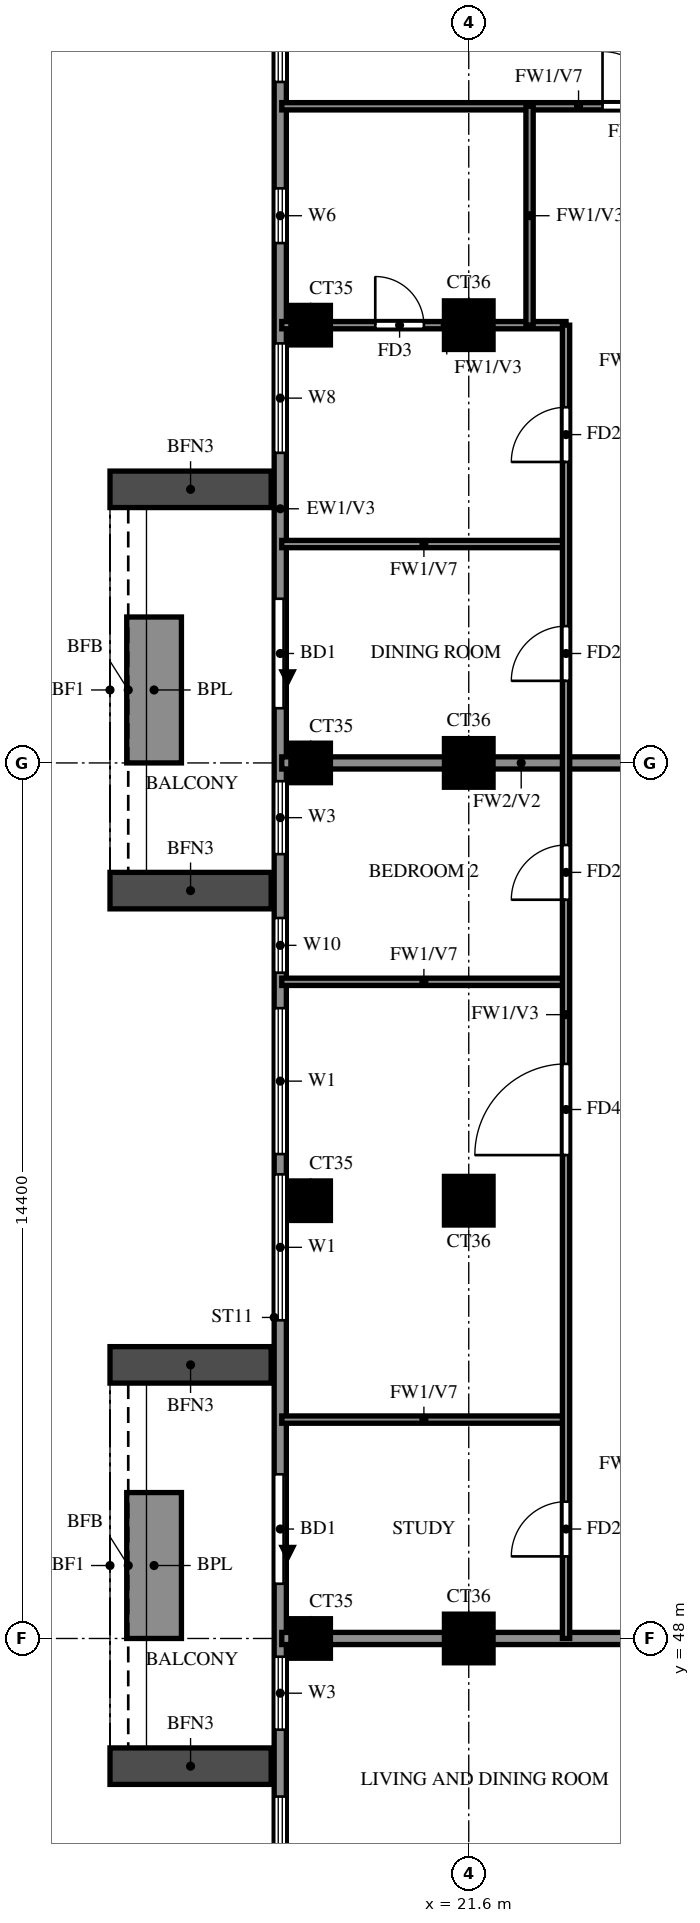
"""IFC4 building model, lengths in metres.
Left out: names, types, materials, properties, quantities, classifications, styles, units other than length and angle.
Written with IfcOpenShell. Run it as: python <this file> out.ifc"""

import sys

from ifc_helpers import new_model, si_unit, direction, frame, frame_2d, origin, origin_2d, place, context, subcontext, project, spatial, rectangle, extrude, source, transform, mapped, element, fill, save


model = new_model("IFC4")
c1 = context("Model", 3, precision=1e-05, world=origin(), true_north=direction((0.0, 1.0)))
c2 = subcontext(c1, "Body", "Model", "MODEL_VIEW")
j1 = project(units=[si_unit("LENGTHUNIT", "METRE"), si_unit("PLANEANGLEUNIT", "RADIAN")], contexts=[c1])
p1 = place(None, origin())
s1 = spatial("IfcSite", under=j1, at=p1, CompositionType="ELEMENT")
p2 = place(p1, origin())
s2 = spatial("IfcBuilding", under=s1, at=p2, CompositionType="ELEMENT")
p3 = place(p2, frame((0.0, 0.0, 250.0)))
s3 = spatial("IfcBuildingStorey", under=s2, at=p3, CompositionType="ELEMENT", Elevation=250.0)
m1 = source(origin(), c2, "Body", "SweptSolid", [
    extrude(rectangle(XDim=0.65, YDim=0.65, at=origin_2d()), origin(), (0.0, 0.0, 1.0), 3.22),
])
p4 = place(p3, frame((19.0, 48.0, 0.0), z_axis=(0.0, 0.0, 1.0), x_axis=(1.0, 0.0, 0.0)))
e1 = element("IfcColumn", 1, at=p4, inside=s3, PredefinedType="COLUMN", context=c2, shape_type="MappedRepresentation", body=[
    mapped(m1, transform((0.0, 0.0, 0.0))),
])
m2 = source(origin(), c2, "Body", "SweptSolid", [
    extrude(rectangle(XDim=0.8, YDim=0.8, at=origin_2d()), origin(), (0.0, 0.0, 1.0), 3.22),
])
p5 = place(p3, frame((21.6, 48.0, 0.0), z_axis=(0.0, 0.0, 1.0), x_axis=(1.0, 0.0, 0.0)))
e2 = element("IfcColumn", 2, at=p5, inside=s3, PredefinedType="COLUMN", context=c2, shape_type="MappedRepresentation", body=[
    mapped(m2, transform((0.0, 0.0, 0.0))),
])
p6 = place(p3, frame((19.0, 55.2, 0.0), z_axis=(0.0, 0.0, 1.0), x_axis=(1.0, 0.0, 0.0)))
e3 = element("IfcColumn", 3, at=p6, inside=s3, PredefinedType="COLUMN", context=c2, shape_type="MappedRepresentation", body=[
    mapped(m1, transform((0.0, 0.0, 0.0))),
])
p7 = place(p3, frame((21.6, 55.2, 0.0), z_axis=(0.0, 0.0, 1.0), x_axis=(1.0, 0.0, 0.0)))
e4 = element("IfcColumn", 4, at=p7, inside=s3, PredefinedType="COLUMN", context=c2, shape_type="MappedRepresentation", body=[
    mapped(m2, transform((0.0, 0.0, 0.0))),
])
p8 = place(p3, frame((19.0, 62.4, 0.0), z_axis=(0.0, 0.0, 1.0), x_axis=(1.0, 0.0, 0.0)))
e5 = element("IfcColumn", 5, at=p8, inside=s3, PredefinedType="COLUMN", context=c2, shape_type="MappedRepresentation", body=[
    mapped(m1, transform((0.0, 0.0, 0.0))),
])
p9 = place(p3, frame((21.6, 62.4, 0.0), z_axis=(0.0, 0.0, 1.0), x_axis=(1.0, 0.0, 0.0)))
e6 = element("IfcColumn", 6, at=p9, inside=s3, PredefinedType="COLUMN", context=c2, shape_type="MappedRepresentation", body=[
    mapped(m2, transform((0.0, 0.0, 0.0))),
])
p10 = place(p3, frame((19.0, 69.6, 0.0), z_axis=(0.0, 0.0, 1.0), x_axis=(1.0, 0.0, 0.0)))
e7 = element("IfcColumn", 7, at=p10, inside=s3, PredefinedType="COLUMN", context=c2, shape_type="MappedRepresentation", body=[
    mapped(m1, transform((0.0, 0.0, 0.0))),
])
p11 = place(p3, frame((21.6, 69.6, 0.0), z_axis=(0.0, 0.0, 1.0), x_axis=(1.0, 0.0, 0.0)))
e8 = element("IfcColumn", 8, at=p11, inside=s3, PredefinedType="COLUMN", context=c2, shape_type="MappedRepresentation", body=[
    mapped(m2, transform((0.0, 0.0, 0.0))),
])
p12 = place(p3, frame((18.5, 76.6, 0.0), z_axis=(0.0, 0.0, 1.0), x_axis=(0.0, -1.0, 0.0)))
e9 = element("IfcWall", 9, at=p12, inside=s3, PredefinedType="SOLIDWALL", context=c2, shape_type="SweptSolid", body=[
    extrude(rectangle(XDim=33.4, YDim=0.2, at=frame_2d((16.7, 0.0))), origin(), (0.0, 0.0, 1.0), 3.22),
])
p13 = place(p12, frame((11.5, 0.0, 0.0)))
e10 = element("IfcOpeningElement", 10, at=p13, cuts=e9, PredefinedType="OPENING", context=c2, shape_type="SweptSolid", body=[
    extrude(rectangle(XDim=1.8, YDim=2.4, at=frame_2d((0.9, 1.2))), frame((0.0, 0.11, 0.0), z_axis=(0.0, -1.0, 0.0), x_axis=(1.0, 0.0, 0.0)), (0.0, 0.0, 1.0), 0.22),
])
p14 = place(p12, frame((25.9, 0.0, 0.0)))
e11 = element("IfcOpeningElement", 11, at=p14, cuts=e9, PredefinedType="OPENING", context=c2, shape_type="SweptSolid", body=[
    extrude(rectangle(XDim=1.8, YDim=2.4, at=frame_2d((0.9, 1.2))), frame((0.0, 0.11, 0.0), z_axis=(0.0, -1.0, 0.0), x_axis=(1.0, 0.0, 0.0)), (0.0, 0.0, 1.0), 0.22),
])
p15 = place(p12, frame((28.9, 0.0, 0.6)))
e12 = element("IfcOpeningElement", 12, at=p15, cuts=e9, PredefinedType="OPENING", context=c2, shape_type="SweptSolid", body=[
    extrude(rectangle(XDim=1.2, YDim=2.4, at=frame_2d((0.6, 1.2))), frame((0.0, 0.11, 0.0), z_axis=(0.0, -1.0, 0.0), x_axis=(1.0, 0.0, 0.0)), (0.0, 0.0, 1.0), 0.22),
])
p16 = place(p12, frame((31.2, 0.0, 0.6)))
e13 = element("IfcOpeningElement", 13, at=p16, cuts=e9, PredefinedType="OPENING", context=c2, shape_type="SweptSolid", body=[
    extrude(rectangle(XDim=1.8, YDim=2.4, at=frame_2d((0.9, 1.2))), frame((0.0, 0.11, 0.0), z_axis=(0.0, -1.0, 0.0), x_axis=(1.0, 0.0, 0.0)), (0.0, 0.0, 1.0), 0.22),
])
p17 = place(p12, frame((18.233, 0.0, 0.6)))
e14 = element("IfcOpeningElement", 14, at=p17, cuts=e9, PredefinedType="OPENING", context=c2, shape_type="SweptSolid", body=[
    extrude(rectangle(XDim=2.4, YDim=2.4, at=frame_2d((1.2, 1.2))), frame((0.0, 0.11, 0.0), z_axis=(0.0, -1.0, 0.0), x_axis=(1.0, 0.0, 0.0)), (0.0, 0.0, 1.0), 0.22),
])
p18 = place(p12, frame((20.967, 0.0, 0.6)))
e15 = element("IfcOpeningElement", 15, at=p18, cuts=e9, PredefinedType="OPENING", context=c2, shape_type="SweptSolid", body=[
    extrude(rectangle(XDim=2.4, YDim=2.4, at=frame_2d((1.2, 1.2))), frame((0.0, 0.11, 0.0), z_axis=(0.0, -1.0, 0.0), x_axis=(1.0, 0.0, 0.0)), (0.0, 0.0, 1.0), 0.22),
])
p19 = place(p12, frame((14.5, 0.0, 0.6)))
e16 = element("IfcOpeningElement", 16, at=p19, cuts=e9, PredefinedType="OPENING", context=c2, shape_type="SweptSolid", body=[
    extrude(rectangle(XDim=1.2, YDim=2.4, at=frame_2d((0.6, 1.2))), frame((0.0, 0.11, 0.0), z_axis=(0.0, -1.0, 0.0), x_axis=(1.0, 0.0, 0.0)), (0.0, 0.0, 1.0), 0.22),
])
p20 = place(p12, frame((16.75, 0.0, 0.6)))
e17 = element("IfcOpeningElement", 17, at=p20, cuts=e9, PredefinedType="OPENING", context=c2, shape_type="SweptSolid", body=[
    extrude(rectangle(XDim=0.9, YDim=2.4, at=frame_2d((0.45, 1.2))), frame((0.0, 0.11, 0.0), z_axis=(0.0, -1.0, 0.0), x_axis=(1.0, 0.0, 0.0)), (0.0, 0.0, 1.0), 0.22),
])
p21 = place(p12, frame((7.3, 0.0, 0.6)))
e18 = element("IfcOpeningElement", 18, at=p21, cuts=e9, PredefinedType="OPENING", context=c2, shape_type="SweptSolid", body=[
    extrude(rectangle(XDim=1.8, YDim=2.4, at=frame_2d((0.9, 1.2))), frame((0.0, 0.11, 0.0), z_axis=(0.0, -1.0, 0.0), x_axis=(1.0, 0.0, 0.0)), (0.0, 0.0, 1.0), 0.22),
])
p22 = place(p12, frame((4.75, 0.0, 1.5)))
e19 = element("IfcOpeningElement", 19, at=p22, cuts=e9, PredefinedType="OPENING", context=c2, shape_type="SweptSolid", body=[
    extrude(rectangle(XDim=0.9, YDim=0.9, at=frame_2d((0.45, 0.45))), frame((0.0, 0.11, 0.0), z_axis=(0.0, -1.0, 0.0), x_axis=(1.0, 0.0, 0.0)), (0.0, 0.0, 1.0), 0.22),
])
p23 = place(p12, frame((0.6, 0.0, 0.6)))
e20 = element("IfcOpeningElement", 20, at=p23, cuts=e9, PredefinedType="OPENING", context=c2, shape_type="SweptSolid", body=[
    extrude(rectangle(XDim=2.4, YDim=2.4, at=frame_2d((1.2, 1.2))), frame((0.0, 0.11, 0.0), z_axis=(0.0, -1.0, 0.0), x_axis=(1.0, 0.0, 0.0)), (0.0, 0.0, 1.0), 0.22),
])
for number, where, z_axis, x_axis in (
    (21, (18.35, 66.9, 0.0), (0.0, 0.0, 1.0), (-1.0, 0.0, 0.0)),
    (22, (18.35, 60.3, 0.0), (0.0, 0.0, 1.0), (-1.0, 0.0, 0.0)),
):
    element("IfcWall", number, at=place(p3, frame(where, z_axis=z_axis, x_axis=x_axis)), inside=s3, PredefinedType="SOLIDWALL", context=c2, shape_type="SweptSolid", body=[
        extrude(rectangle(XDim=2.65, YDim=0.6, at=frame_2d((1.325, 0.0))), origin(), (0.0, 0.0, 1.0), 2.85),
    ])
p24 = place(p3, frame((16.425, 64.8, 0.0), z_axis=(0.0, 0.0, 1.0), x_axis=(0.0, -1.0, 0.0)))
e23 = element("IfcWall", 23, at=p24, inside=s3, PredefinedType="SOLIDWALL", context=c2, shape_type="SweptSolid", body=[
    extrude(rectangle(XDim=2.4, YDim=0.9, at=frame_2d((1.2, 0.0))), origin(), (0.0, 0.0, 1.0), 0.9),
])
for number, where, z_axis, x_axis in (
    (24, (18.35, 52.5, 0.0), (0.0, 0.0, 1.0), (-1.0, 0.0, 0.0)),
    (25, (18.35, 45.9, 0.0), (0.0, 0.0, 1.0), (-1.0, 0.0, 0.0)),
):
    element("IfcWall", number, at=place(p3, frame(where, z_axis=z_axis, x_axis=x_axis)), inside=s3, PredefinedType="SOLIDWALL", context=c2, shape_type="SweptSolid", body=[
        extrude(rectangle(XDim=2.65, YDim=0.6, at=frame_2d((1.325, 0.0))), origin(), (0.0, 0.0, 1.0), 2.85),
    ])
p25 = place(p3, frame((16.425, 50.4, 0.0), z_axis=(0.0, 0.0, 1.0), x_axis=(0.0, -1.0, 0.0)))
e26 = element("IfcWall", 26, at=p25, inside=s3, PredefinedType="SOLIDWALL", context=c2, shape_type="SweptSolid", body=[
    extrude(rectangle(XDim=2.4, YDim=0.9, at=frame_2d((1.2, 0.0))), origin(), (0.0, 0.0, 1.0), 0.9),
])
p26 = place(p3, frame((18.525, 48.0, 0.0), z_axis=(0.0, 0.0, 1.0), x_axis=(1.0, 0.0, 0.0)))
e27 = element("IfcWall", 27, at=p26, inside=s3, PredefinedType="SOLIDWALL", context=c2, shape_type="SweptSolid", body=[
    extrude(rectangle(XDim=15.075, YDim=0.2, at=frame_2d((7.538, 0.0))), origin(), (0.0, 0.0, 1.0), 3.22),
])
p27 = place(p3, frame((18.525, 62.4, 0.0), z_axis=(0.0, 0.0, 1.0), x_axis=(1.0, 0.0, 0.0)))
e28 = element("IfcWall", 28, at=p27, inside=s3, PredefinedType="SOLIDWALL", context=c2, shape_type="SweptSolid", body=[
    extrude(rectangle(XDim=7.875, YDim=0.2, at=frame_2d((3.938, 0.0))), origin(), (0.0, 0.0, 1.0), 3.22),
])
for number, where, z_axis, x_axis in (
    (29, (18.525, 51.6, 0.0), (0.0, 0.0, 1.0), (1.0, 0.0, 0.0)),
    (30, (18.525, 58.8, 0.0), (0.0, 0.0, 1.0), (1.0, 0.0, 0.0)),
    (31, (18.525, 66.0, 0.0), (0.0, 0.0, 1.0), (1.0, 0.0, 0.0)),
):
    element("IfcWall", number, at=place(p3, frame(where, z_axis=z_axis, x_axis=x_axis)), inside=s3, PredefinedType="PARTITIONING", context=c2, shape_type="SweptSolid", body=[
        extrude(rectangle(XDim=4.675, YDim=0.12, at=frame_2d((2.337, 0.0))), origin(), (0.0, 0.0, 1.0), 2.32),
    ])
p28 = place(p3, frame((18.525, 69.6, 0.0), z_axis=(0.0, 0.0, 1.0), x_axis=(1.0, 0.0, 0.0)))
e32 = element("IfcWall", 32, at=p28, inside=s3, PredefinedType="PARTITIONING", context=c2, shape_type="SweptSolid", body=[
    extrude(rectangle(XDim=4.675, YDim=0.12, at=frame_2d((2.337, 0.0))), origin(), (0.0, 0.0, 1.0), 3.22),
])
p29 = place(p28, frame((1.538, 0.0, 0.0)))
e33 = element("IfcOpeningElement", 33, at=p29, cuts=e32, PredefinedType="OPENING", context=c2, shape_type="SweptSolid", body=[
    extrude(rectangle(XDim=0.8, YDim=2.1, at=frame_2d((0.4, 1.05))), frame((0.0, 0.07, 0.0), z_axis=(0.0, -1.0, 0.0), x_axis=(1.0, 0.0, 0.0)), (0.0, 0.0, 1.0), 0.14),
])
p30 = place(p3, frame((18.525, 73.2, 0.0), z_axis=(0.0, 0.0, 1.0), x_axis=(1.0, 0.0, 0.0)))
e34 = element("IfcWall", 34, at=p30, inside=s3, PredefinedType="PARTITIONING", context=c2, shape_type="SweptSolid", body=[
    extrude(rectangle(XDim=10.275, YDim=0.12, at=frame_2d((5.138, 0.0))), origin(), (0.0, 0.0, 1.0), 2.32),
])
p31 = place(p30, frame((5.275, 0.0, 0.0)))
e35 = element("IfcOpeningElement", 35, at=p31, cuts=e34, PredefinedType="OPENING", context=c2, shape_type="SweptSolid", body=[
    extrude(rectangle(XDim=0.9, YDim=2.1, at=frame_2d((0.45, 1.05))), frame((0.0, 0.07, 0.0), z_axis=(0.0, -1.0, 0.0), x_axis=(1.0, 0.0, 0.0)), (0.0, 0.0, 1.0), 0.14),
])
p32 = place(p3, frame((22.6, 69.6, 0.0), z_axis=(0.0, 0.0, 1.0), x_axis=(0.0, 1.0, 0.0)))
e36 = element("IfcWall", 36, at=p32, inside=s3, PredefinedType="PARTITIONING", context=c2, shape_type="SweptSolid", body=[
    extrude(rectangle(XDim=3.6, YDim=0.12, at=frame_2d((1.8, 0.0))), origin(), (0.0, 0.0, 1.0), 3.22),
])
p33 = place(p3, frame((23.2, 48.0, 0.0), z_axis=(0.0, 0.0, 1.0), x_axis=(0.0, 1.0, 0.0)))
e37 = element("IfcWall", 37, at=p33, inside=s3, PredefinedType="PARTITIONING", context=c2, shape_type="SweptSolid", body=[
    extrude(rectangle(XDim=21.6, YDim=0.12, at=frame_2d((10.8, 0.0))), origin(), (0.0, 0.0, 1.0), 3.22),
])
p34 = place(p33, frame((1.35, 0.0, 0.0)))
e38 = element("IfcOpeningElement", 38, at=p34, cuts=e37, PredefinedType="OPENING", context=c2, shape_type="SweptSolid", body=[
    extrude(rectangle(XDim=0.9, YDim=2.1, at=frame_2d((0.45, 1.05))), frame((0.0, 0.07, 0.0), z_axis=(0.0, -1.0, 0.0), x_axis=(1.0, 0.0, 0.0)), (0.0, 0.0, 1.0), 0.14),
])
p35 = place(p33, frame((7.95, 0.0, 0.0)))
e39 = element("IfcOpeningElement", 39, at=p35, cuts=e37, PredefinedType="OPENING", context=c2, shape_type="SweptSolid", body=[
    extrude(rectangle(XDim=1.5, YDim=2.1, at=frame_2d((0.75, 1.05))), frame((0.0, 0.07, 0.0), z_axis=(0.0, -1.0, 0.0), x_axis=(1.0, 0.0, 0.0)), (0.0, 0.0, 1.0), 0.14),
])
p36 = place(p33, frame((12.15, 0.0, 0.0)))
e40 = element("IfcOpeningElement", 40, at=p36, cuts=e37, PredefinedType="OPENING", context=c2, shape_type="SweptSolid", body=[
    extrude(rectangle(XDim=0.9, YDim=2.1, at=frame_2d((0.45, 1.05))), frame((0.0, 0.07, 0.0), z_axis=(0.0, -1.0, 0.0), x_axis=(1.0, 0.0, 0.0)), (0.0, 0.0, 1.0), 0.14),
])
p37 = place(p33, frame((15.75, 0.0, 0.0)))
e41 = element("IfcOpeningElement", 41, at=p37, cuts=e37, PredefinedType="OPENING", context=c2, shape_type="SweptSolid", body=[
    extrude(rectangle(XDim=0.9, YDim=2.1, at=frame_2d((0.45, 1.05))), frame((0.0, 0.07, 0.0), z_axis=(0.0, -1.0, 0.0), x_axis=(1.0, 0.0, 0.0)), (0.0, 0.0, 1.0), 0.14),
])
p38 = place(p33, frame((19.35, 0.0, 0.0)))
e42 = element("IfcOpeningElement", 42, at=p38, cuts=e37, PredefinedType="OPENING", context=c2, shape_type="SweptSolid", body=[
    extrude(rectangle(XDim=0.9, YDim=2.1, at=frame_2d((0.45, 1.05))), frame((0.0, 0.07, 0.0), z_axis=(0.0, -1.0, 0.0), x_axis=(1.0, 0.0, 0.0)), (0.0, 0.0, 1.0), 0.14),
])
p39 = place(p13, origin())
e43 = element("IfcDoor", 43, at=p39, inside=s3, OperationType="DOUBLE_DOOR_SLIDING", PredefinedType="DOOR", context=c2, shape_type="SweptSolid", body=[
    extrude(rectangle(XDim=1.8, YDim=2.4, at=frame_2d((0.9, 1.2))), frame((0.0, 0.025, 0.0), z_axis=(0.0, -1.0, 0.0), x_axis=(1.0, 0.0, 0.0)), (0.0, 0.0, 1.0), 0.05),
])
fill(e10, e43)
p40 = place(p14, origin())
e44 = element("IfcDoor", 44, at=p40, inside=s3, OperationType="DOUBLE_DOOR_SLIDING", PredefinedType="DOOR", context=c2, shape_type="SweptSolid", body=[
    extrude(rectangle(XDim=1.8, YDim=2.4, at=frame_2d((0.9, 1.2))), frame((0.0, 0.025, 0.0), z_axis=(0.0, -1.0, 0.0), x_axis=(1.0, 0.0, 0.0)), (0.0, 0.0, 1.0), 0.05),
])
fill(e11, e44)
p41 = place(p15, origin())
e45 = element("IfcWindow", 45, at=p41, inside=s3, PartitioningType="SINGLE_PANEL", PredefinedType="WINDOW", context=c2, shape_type="SweptSolid", body=[
    extrude(rectangle(XDim=1.2, YDim=2.4, at=frame_2d((0.6, 1.2))), frame((0.0, 0.03, 0.0), z_axis=(0.0, -1.0, 0.0), x_axis=(1.0, 0.0, 0.0)), (0.0, 0.0, 1.0), 0.06),
])
fill(e12, e45)
p42 = place(p16, origin())
e46 = element("IfcWindow", 46, at=p42, inside=s3, PartitioningType="DOUBLE_PANEL_VERTICAL", PredefinedType="WINDOW", context=c2, shape_type="SweptSolid", body=[
    extrude(rectangle(XDim=1.8, YDim=2.4, at=frame_2d((0.9, 1.2))), frame((0.0, 0.03, 0.0), z_axis=(0.0, -1.0, 0.0), x_axis=(1.0, 0.0, 0.0)), (0.0, 0.0, 1.0), 0.06),
])
fill(e13, e46)
p43 = place(p17, origin())
e47 = element("IfcWindow", 47, at=p43, inside=s3, PartitioningType="DOUBLE_PANEL_VERTICAL", PredefinedType="WINDOW", context=c2, shape_type="SweptSolid", body=[
    extrude(rectangle(XDim=2.4, YDim=2.4, at=frame_2d((1.2, 1.2))), frame((0.0, 0.03, 0.0), z_axis=(0.0, -1.0, 0.0), x_axis=(1.0, 0.0, 0.0)), (0.0, 0.0, 1.0), 0.06),
])
fill(e14, e47)
p44 = place(p18, origin())
e48 = element("IfcWindow", 48, at=p44, inside=s3, PartitioningType="DOUBLE_PANEL_VERTICAL", PredefinedType="WINDOW", context=c2, shape_type="SweptSolid", body=[
    extrude(rectangle(XDim=2.4, YDim=2.4, at=frame_2d((1.2, 1.2))), frame((0.0, 0.03, 0.0), z_axis=(0.0, -1.0, 0.0), x_axis=(1.0, 0.0, 0.0)), (0.0, 0.0, 1.0), 0.06),
])
fill(e15, e48)
p45 = place(p19, origin())
e49 = element("IfcWindow", 49, at=p45, inside=s3, PartitioningType="SINGLE_PANEL", PredefinedType="WINDOW", context=c2, shape_type="SweptSolid", body=[
    extrude(rectangle(XDim=1.2, YDim=2.4, at=frame_2d((0.6, 1.2))), frame((0.0, 0.03, 0.0), z_axis=(0.0, -1.0, 0.0), x_axis=(1.0, 0.0, 0.0)), (0.0, 0.0, 1.0), 0.06),
])
fill(e16, e49)
p46 = place(p20, origin())
e50 = element("IfcWindow", 50, at=p46, inside=s3, PartitioningType="SINGLE_PANEL", PredefinedType="WINDOW", context=c2, shape_type="SweptSolid", body=[
    extrude(rectangle(XDim=0.9, YDim=2.4, at=frame_2d((0.45, 1.2))), frame((0.0, 0.03, 0.0), z_axis=(0.0, -1.0, 0.0), x_axis=(1.0, 0.0, 0.0)), (0.0, 0.0, 1.0), 0.06),
])
fill(e17, e50)
p47 = place(p21, origin())
e51 = element("IfcWindow", 51, at=p47, inside=s3, PartitioningType="DOUBLE_PANEL_VERTICAL", PredefinedType="WINDOW", context=c2, shape_type="SweptSolid", body=[
    extrude(rectangle(XDim=1.8, YDim=2.4, at=frame_2d((0.9, 1.2))), frame((0.0, 0.03, 0.0), z_axis=(0.0, -1.0, 0.0), x_axis=(1.0, 0.0, 0.0)), (0.0, 0.0, 1.0), 0.06),
])
fill(e18, e51)
p48 = place(p22, origin())
e52 = element("IfcWindow", 52, at=p48, inside=s3, PartitioningType="SINGLE_PANEL", PredefinedType="WINDOW", context=c2, shape_type="SweptSolid", body=[
    extrude(rectangle(XDim=0.9, YDim=0.9, at=frame_2d((0.45, 0.45))), frame((0.0, 0.03, 0.0), z_axis=(0.0, -1.0, 0.0), x_axis=(1.0, 0.0, 0.0)), (0.0, 0.0, 1.0), 0.06),
])
fill(e19, e52)
p49 = place(p23, origin())
e53 = element("IfcWindow", 53, at=p49, inside=s3, PartitioningType="DOUBLE_PANEL_VERTICAL", PredefinedType="WINDOW", context=c2, shape_type="SweptSolid", body=[
    extrude(rectangle(XDim=2.4, YDim=2.4, at=frame_2d((1.2, 1.2))), frame((0.0, 0.03, 0.0), z_axis=(0.0, -1.0, 0.0), x_axis=(1.0, 0.0, 0.0)), (0.0, 0.0, 1.0), 0.06),
])
fill(e20, e53)
p50 = place(p34, origin())
e54 = element("IfcDoor", 54, at=p50, inside=s3, OperationType="SINGLE_SWING_RIGHT", PredefinedType="DOOR", context=c2, shape_type="SweptSolid", body=[
    extrude(rectangle(XDim=0.9, YDim=2.1, at=frame_2d((0.45, 1.05))), frame((0.0, 0.025, 0.0), z_axis=(0.0, -1.0, 0.0), x_axis=(1.0, 0.0, 0.0)), (0.0, 0.0, 1.0), 0.05),
])
fill(e38, e54)
p51 = place(p35, origin())
e55 = element("IfcDoor", 55, at=p51, inside=s3, OperationType="SINGLE_SWING_RIGHT", PredefinedType="DOOR", context=c2, shape_type="SweptSolid", body=[
    extrude(rectangle(XDim=1.5, YDim=2.1, at=frame_2d((0.75, 1.05))), frame((0.0, 0.025, 0.0), z_axis=(0.0, -1.0, 0.0), x_axis=(1.0, 0.0, 0.0)), (0.0, 0.0, 1.0), 0.05),
])
fill(e39, e55)
p52 = place(p36, origin())
e56 = element("IfcDoor", 56, at=p52, inside=s3, OperationType="SINGLE_SWING_LEFT", PredefinedType="DOOR", context=c2, shape_type="SweptSolid", body=[
    extrude(rectangle(XDim=0.9, YDim=2.1, at=frame_2d((0.45, 1.05))), frame((0.0, 0.025, 0.0), z_axis=(0.0, -1.0, 0.0), x_axis=(1.0, 0.0, 0.0)), (0.0, 0.0, 1.0), 0.05),
])
fill(e40, e56)
p53 = place(p37, origin())
e57 = element("IfcDoor", 57, at=p53, inside=s3, OperationType="SINGLE_SWING_LEFT", PredefinedType="DOOR", context=c2, shape_type="SweptSolid", body=[
    extrude(rectangle(XDim=0.9, YDim=2.1, at=frame_2d((0.45, 1.05))), frame((0.0, 0.025, 0.0), z_axis=(0.0, -1.0, 0.0), x_axis=(1.0, 0.0, 0.0)), (0.0, 0.0, 1.0), 0.05),
])
fill(e41, e57)
p54 = place(p38, origin())
e58 = element("IfcDoor", 58, at=p54, inside=s3, OperationType="SINGLE_SWING_LEFT", PredefinedType="DOOR", context=c2, shape_type="SweptSolid", body=[
    extrude(rectangle(XDim=0.9, YDim=2.1, at=frame_2d((0.45, 1.05))), frame((0.0, 0.025, 0.0), z_axis=(0.0, -1.0, 0.0), x_axis=(1.0, 0.0, 0.0)), (0.0, 0.0, 1.0), 0.05),
])
fill(e42, e58)
p55 = place(p29, origin())
e59 = element("IfcDoor", 59, at=p55, inside=s3, OperationType="SINGLE_SWING_LEFT", PredefinedType="DOOR", context=c2, shape_type="SweptSolid", body=[
    extrude(rectangle(XDim=0.8, YDim=2.1, at=frame_2d((0.4, 1.05))), frame((0.0, 0.025, 0.0), z_axis=(0.0, -1.0, 0.0), x_axis=(1.0, 0.0, 0.0)), (0.0, 0.0, 1.0), 0.05),
])
fill(e33, e59)
p56 = place(p31, origin())
e60 = element("IfcDoor", 60, at=p56, inside=s3, OperationType="SINGLE_SWING_LEFT", PredefinedType="DOOR", context=c2, shape_type="SweptSolid", body=[
    extrude(rectangle(XDim=0.9, YDim=2.1, at=frame_2d((0.45, 1.05))), frame((0.0, 0.025, 0.0), z_axis=(0.0, -1.0, 0.0), x_axis=(1.0, 0.0, 0.0)), (0.0, 0.0, 1.0), 0.05),
])
fill(e35, e60)
save(model, sys.argv[1])
